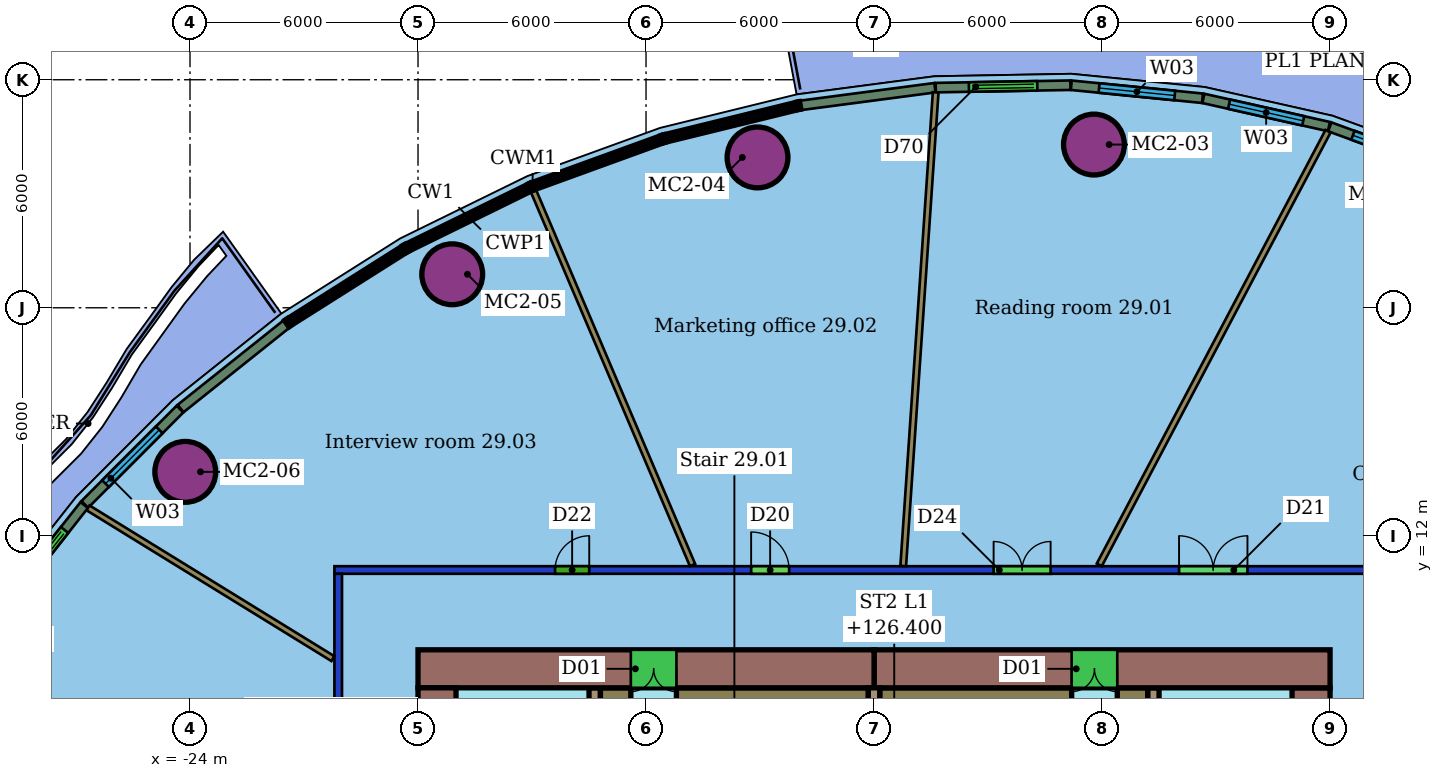
"""IFC4 building model, lengths in metres.
Left out: names, types, materials, properties, quantities, classifications, styles, units other than length and angle.
Written with IfcOpenShell. Run it as: python <this file> out.ifc"""

import sys

from ifc_helpers import new_model, si_unit, direction, frame, frame_2d, origin, origin_2d, place, context, subcontext, project, spatial, rectangle, hollow_circle, extrude, element, fill, save


model = new_model("IFC4")
c1 = context("Model", 3, precision=1e-05, world=origin(), true_north=direction((0.0, 1.0)))
c2 = subcontext(c1, "Body", "Model", "MODEL_VIEW")
j1 = project(units=[si_unit("LENGTHUNIT", "METRE"), si_unit("PLANEANGLEUNIT", "RADIAN")], contexts=[c1])
p1 = place(None, origin())
s1 = spatial("IfcSite", under=j1, at=p1, CompositionType="ELEMENT")
p2 = place(p1, origin())
s2 = spatial("IfcBuilding", under=s1, at=p2, CompositionType="ELEMENT")
p3 = place(p2, frame((0.0, 0.0, 124.6)))
s3 = spatial("IfcBuildingStorey", under=s2, at=p3, CompositionType="ELEMENT", Elevation=124.6)
for number, where, z_axis, x_axis in (
    (1, (-0.213, 22.294, 0.0), (0.0, 0.0, 1.0), (1.0, 0.0, 0.0)),
    (2, (-9.066, 21.956, 0.0), (0.0, 0.0, 1.0), (1.0, 0.0, 0.0)),
    (3, (-17.1, 18.881, 0.0), (0.0, 0.0, 1.0), (1.0, 0.0, 0.0)),
    (4, (-24.125, 13.683, 0.0), (0.0, 0.0, 1.0), (1.0, 0.0, 0.0)),
):
    element("IfcColumn", number, at=place(p3, frame(where, z_axis=z_axis, x_axis=x_axis)), inside=s3, PredefinedType="COLUMN", context=c2, shape_type="SweptSolid", body=[
        extrude(hollow_circle(Radius=0.8, WallThickness=0.055, at=origin_2d()), origin(), (0.0, 0.0, 1.0), 3.45),
    ])
p4 = place(p3, frame((-20.1, -11.0, 0.0), z_axis=(0.0, 0.0, 1.0), x_axis=(0.0, 1.0, 0.0)))
e5 = element("IfcWall", 5, at=p4, inside=s3, PredefinedType="PARTITIONING", context=c2, shape_type="SweptSolid", body=[
    extrude(rectangle(XDim=22.0, YDim=0.2, at=frame_2d((11.0, 0.0))), origin(), (0.0, 0.0, 1.0), 3.0),
])
p5 = place(p4, frame((15.057, 0.0, 0.0)))
e6 = element("IfcOpeningElement", 6, at=p5, cuts=e5, PredefinedType="OPENING", context=c2, shape_type="SweptSolid", body=[
    extrude(rectangle(XDim=1.0, YDim=2.1, at=frame_2d((0.5, 1.05))), frame((0.0, 0.11, 0.0), z_axis=(0.0, -1.0, 0.0), x_axis=(1.0, 0.0, 0.0)), (0.0, 0.0, 1.0), 0.22),
])
p6 = place(p4, frame((9.649, 0.0, 0.0)))
e7 = element("IfcOpeningElement", 7, at=p6, cuts=e5, PredefinedType="OPENING", context=c2, shape_type="SweptSolid", body=[
    extrude(rectangle(XDim=1.0, YDim=2.4, at=frame_2d((0.5, 1.2))), frame((0.0, 0.11, 0.0), z_axis=(0.0, -1.0, 0.0), x_axis=(1.0, 0.0, 0.0)), (0.0, 0.0, 1.0), 0.22),
])
p7 = place(p4, frame((5.594, 0.0, 0.0)))
e8 = element("IfcOpeningElement", 8, at=p7, cuts=e5, PredefinedType="OPENING", context=c2, shape_type="SweptSolid", body=[
    extrude(rectangle(XDim=1.8, YDim=2.4, at=frame_2d((0.9, 1.2))), frame((0.0, 0.11, 0.0), z_axis=(0.0, -1.0, 0.0), x_axis=(1.0, 0.0, 0.0)), (0.0, 0.0, 1.0), 0.22),
])
p8 = place(p3, frame((-20.2, 11.1, 0.0), z_axis=(0.0, 0.0, 1.0), x_axis=(1.0, 0.0, 0.0)))
e9 = element("IfcWall", 9, at=p8, inside=s3, PredefinedType="PARTITIONING", context=c2, shape_type="SweptSolid", body=[
    extrude(rectangle(XDim=28.4, YDim=0.2, at=frame_2d((14.2, 0.0))), origin(), (0.0, 0.0, 1.0), 3.0),
])
p9 = place(p8, frame((17.346, 0.0, 0.0)))
e10 = element("IfcOpeningElement", 10, at=p9, cuts=e9, PredefinedType="OPENING", context=c2, shape_type="SweptSolid", body=[
    extrude(rectangle(XDim=1.5, YDim=2.1, at=frame_2d((0.75, 1.05))), frame((0.0, 0.11, 0.0), z_axis=(0.0, -1.0, 0.0), x_axis=(1.0, 0.0, 0.0)), (0.0, 0.0, 1.0), 0.22),
])
p10 = place(p8, frame((10.966, 0.0, 0.0)))
e11 = element("IfcOpeningElement", 11, at=p10, cuts=e9, PredefinedType="OPENING", context=c2, shape_type="SweptSolid", body=[
    extrude(rectangle(XDim=1.0, YDim=2.1, at=frame_2d((0.5, 1.05))), frame((0.0, 0.11, 0.0), z_axis=(0.0, -1.0, 0.0), x_axis=(1.0, 0.0, 0.0)), (0.0, 0.0, 1.0), 0.22),
])
p11 = place(p8, frame((5.806, 0.0, 0.0)))
e12 = element("IfcOpeningElement", 12, at=p11, cuts=e9, PredefinedType="OPENING", context=c2, shape_type="SweptSolid", body=[
    extrude(rectangle(XDim=0.9, YDim=2.1, at=frame_2d((0.45, 1.05))), frame((0.0, 0.11, 0.0), z_axis=(0.0, -1.0, 0.0), x_axis=(1.0, 0.0, 0.0)), (0.0, 0.0, 1.0), 0.22),
])
p12 = place(p8, frame((22.226, 0.0, 0.0)))
e13 = element("IfcOpeningElement", 13, at=p12, cuts=e9, PredefinedType="OPENING", context=c2, shape_type="SweptSolid", body=[
    extrude(rectangle(XDim=1.8, YDim=2.1, at=frame_2d((0.9, 1.05))), frame((0.0, 0.11, 0.0), z_axis=(0.0, -1.0, 0.0), x_axis=(1.0, 0.0, 0.0)), (0.0, 0.0, 1.0), 0.22),
])
p13 = place(p3, frame((5.946, 22.644, 0.0), z_axis=(0.0, 0.0, 1.0), x_axis=(-0.466623744036, -0.884455924002, 0.0)))
e14 = element("IfcWall", 14, at=p13, inside=s3, PredefinedType="PARTITIONING", context=c2, shape_type="SweptSolid", body=[
    extrude(rectangle(XDim=12.9, YDim=0.15, at=frame_2d((6.45, 0.0))), origin(), (0.0, 0.0, 1.0), 3.45),
])
p14 = place(p3, frame((-4.378, 23.667, 0.0), z_axis=(0.0, 0.0, 1.0), x_axis=(-0.068347975622, -0.997661542923, 0.0)))
e15 = element("IfcWall", 15, at=p14, inside=s3, PredefinedType="PARTITIONING", context=c2, shape_type="SweptSolid", body=[
    extrude(rectangle(XDim=12.491, YDim=0.15, at=frame_2d((6.246, 0.0))), origin(), (0.0, 0.0, 1.0), 3.45),
])
p15 = place(p3, frame((-14.961, 21.071, 0.0), z_axis=(0.0, 0.0, 1.0), x_axis=(0.391369274345, -0.920233715476, 0.0)))
e16 = element("IfcWall", 16, at=p15, inside=s3, PredefinedType="PARTITIONING", context=c2, shape_type="SweptSolid", body=[
    extrude(rectangle(XDim=10.695, YDim=0.15, at=frame_2d((5.347, 0.0))), origin(), (0.0, 0.0, 1.0), 3.45),
])
p16 = place(p3, frame((-26.683, 12.735, 0.0), z_axis=(0.0, 0.0, 1.0), x_axis=(0.851532002379, -0.524302631049, 0.0)))
e17 = element("IfcWall", 17, at=p16, inside=s3, PredefinedType="PARTITIONING", context=c2, shape_type="SweptSolid", body=[
    extrude(rectangle(XDim=7.567, YDim=0.15, at=frame_2d((3.783, 0.0))), origin(), (0.0, 0.0, 1.0), 3.45),
])
p17 = place(p3, frame((9.089, 21.632, 0.0), z_axis=(0.0, 0.0, 1.0), x_axis=(-0.939579104827, 0.342331864969, 0.0)))
e18 = element("IfcWall", 18, at=p17, inside=s3, PredefinedType="SOLIDWALL", context=c2, shape_type="SweptSolid", body=[
    extrude(rectangle(XDim=3.296, YDim=0.25, at=frame_2d((1.648, 0.0))), origin(), (0.0, 0.0, 1.0), 3.05),
])
p18 = place(p17, frame((0.648, 0.0, 0.9)))
e19 = element("IfcOpeningElement", 19, at=p18, cuts=e18, PredefinedType="OPENING", context=c2, shape_type="SweptSolid", body=[
    extrude(rectangle(XDim=2.0, YDim=2.1, at=frame_2d((1.0, 1.05))), frame((0.0, 0.135, 0.0), z_axis=(0.0, -1.0, 0.0), x_axis=(1.0, 0.0, 0.0)), (0.0, 0.0, 1.0), 0.27),
])
p19 = place(p3, frame((5.969, 22.767, 0.0), z_axis=(0.0, 0.0, 1.0), x_axis=(-0.975690768568, 0.219151828949, 0.0)))
e20 = element("IfcWall", 20, at=p19, inside=s3, PredefinedType="SOLIDWALL", context=c2, shape_type="SweptSolid", body=[
    extrude(rectangle(XDim=3.385, YDim=0.25, at=frame_2d((1.693, 0.0))), origin(), (0.0, 0.0, 1.0), 3.05),
])
p20 = place(p19, frame((0.693, 0.0, 0.9)))
e21 = element("IfcOpeningElement", 21, at=p20, cuts=e20, PredefinedType="OPENING", context=c2, shape_type="SweptSolid", body=[
    extrude(rectangle(XDim=2.0, YDim=2.1, at=frame_2d((1.0, 1.05))), frame((0.0, 0.135, 0.0), z_axis=(0.0, -1.0, 0.0), x_axis=(1.0, 0.0, 0.0)), (0.0, 0.0, 1.0), 0.27),
])
p21 = place(p3, frame((2.643, 23.513, 0.0), z_axis=(0.0, 0.0, 1.0), x_axis=(-0.995116970578, 0.09870265887, 0.0)))
e22 = element("IfcWall", 22, at=p21, inside=s3, PredefinedType="SOLIDWALL", context=c2, shape_type="SweptSolid", body=[
    extrude(rectangle(XDim=3.47, YDim=0.25, at=frame_2d((1.735, 0.0))), origin(), (0.0, 0.0, 1.0), 3.05),
])
p22 = place(p21, frame((0.735, 0.0, 0.9)))
e23 = element("IfcOpeningElement", 23, at=p22, cuts=e22, PredefinedType="OPENING", context=c2, shape_type="SweptSolid", body=[
    extrude(rectangle(XDim=2.0, YDim=2.1, at=frame_2d((1.0, 1.05))), frame((0.0, 0.135, 0.0), z_axis=(0.0, -1.0, 0.0), x_axis=(1.0, 0.0, 0.0)), (0.0, 0.0, 1.0), 0.27),
])
p23 = place(p3, frame((-0.833, 23.856, 0.0), z_axis=(0.0, 0.0, 1.0), x_axis=(-0.999835910543, -0.018114965863, 0.0)))
e24 = element("IfcWall", 24, at=p23, inside=s3, PredefinedType="SOLIDWALL", context=c2, shape_type="SweptSolid", body=[
    extrude(rectangle(XDim=3.544, YDim=0.25, at=frame_2d((1.772, 0.0))), origin(), (0.0, 0.0, 1.0), 3.05),
])
p24 = place(p23, frame((0.872, 0.0, 0.0)))
e25 = element("IfcOpeningElement", 25, at=p24, cuts=e24, PredefinedType="OPENING", context=c2, shape_type="SweptSolid", body=[
    extrude(rectangle(XDim=1.8, YDim=2.4, at=frame_2d((0.9, 1.2))), frame((0.0, 0.135, 0.0), z_axis=(0.0, -1.0, 0.0), x_axis=(1.0, 0.0, 0.0)), (0.0, 0.0, 1.0), 0.27),
])
p25 = place(p3, frame((-4.399, 23.79, 0.0), z_axis=(0.0, 0.0, 1.0), x_axis=(-0.991455229273, -0.130447416026, 0.0)))
e26 = element("IfcWall", 26, at=p25, inside=s3, PredefinedType="SOLIDWALL", context=c2, shape_type="SweptSolid", body=[
    extrude(rectangle(XDim=3.56, YDim=0.25, at=frame_2d((1.78, 0.0))), origin(), (0.0, 0.0, 1.0), 3.05),
])
p26 = place(p3, frame((-21.465, 17.569, 0.0), z_axis=(0.0, 0.0, 1.0), x_axis=(-0.781691181116, -0.623665693594, 0.0)))
e27 = element("IfcWall", 27, at=p26, inside=s3, PredefinedType="SOLIDWALL", context=c2, shape_type="SweptSolid", body=[
    extrude(rectangle(XDim=3.56, YDim=0.25, at=frame_2d((1.78, 0.0))), origin(), (0.0, 0.0, 1.0), 3.05),
])
p27 = place(p3, frame((-24.264, 15.334, 0.0), z_axis=(0.0, 0.0, 1.0), x_axis=(-0.706555538576, -0.707657594397, 0.0)))
e28 = element("IfcWall", 28, at=p27, inside=s3, PredefinedType="SOLIDWALL", context=c2, shape_type="SweptSolid", body=[
    extrude(rectangle(XDim=3.544, YDim=0.25, at=frame_2d((1.772, 0.0))), origin(), (0.0, 0.0, 1.0), 3.05),
])
p28 = place(p27, frame((0.772, 0.0, 0.9)))
e29 = element("IfcOpeningElement", 29, at=p28, cuts=e28, PredefinedType="OPENING", context=c2, shape_type="SweptSolid", body=[
    extrude(rectangle(XDim=2.0, YDim=2.1, at=frame_2d((1.0, 1.05))), frame((0.0, 0.135, 0.0), z_axis=(0.0, -1.0, 0.0), x_axis=(1.0, 0.0, 0.0)), (0.0, 0.0, 1.0), 0.27),
])
p29 = place(p3, frame((-26.783, 12.809, 0.0), z_axis=(0.0, 0.0, 1.0), x_axis=(-0.61919708365, -0.785235615341, 0.0)))
e30 = element("IfcWall", 30, at=p29, inside=s3, PredefinedType="SOLIDWALL", context=c2, shape_type="SweptSolid", body=[
    extrude(rectangle(XDim=3.47, YDim=0.25, at=frame_2d((1.735, 0.0))), origin(), (0.0, 0.0, 1.0), 3.05),
])
p30 = place(p29, frame((0.835, 0.0, 0.0)))
e31 = element("IfcOpeningElement", 31, at=p30, cuts=e30, PredefinedType="OPENING", context=c2, shape_type="SweptSolid", body=[
    extrude(rectangle(XDim=1.8, YDim=2.4, at=frame_2d((0.9, 1.2))), frame((0.0, 0.135, 0.0), z_axis=(0.0, -1.0, 0.0), x_axis=(1.0, 0.0, 0.0)), (0.0, 0.0, 1.0), 0.27),
])
p31 = place(p3, frame((6.0, 8.5, 0.0), z_axis=(0.0, 0.0, 1.0), x_axis=(-1.0, 0.0, 0.0)))
e32 = element("IfcWall", 32, at=p31, inside=s3, PredefinedType="SHEAR", context=c2, shape_type="SweptSolid", body=[
    extrude(rectangle(XDim=12.0, YDim=1.0, at=frame_2d((6.0, 0.0))), origin(), (0.0, 0.0, 1.0), 3.3),
])
p32 = place(p31, frame((5.6, 0.0, 0.0)))
e33 = element("IfcOpeningElement", 33, at=p32, cuts=e32, PredefinedType="OPENING", context=c2, shape_type="SweptSolid", body=[
    extrude(rectangle(XDim=1.2, YDim=2.1, at=frame_2d((0.6, 1.05))), frame((0.0, 0.51, 0.0), z_axis=(0.0, -1.0, 0.0), x_axis=(1.0, 0.0, 0.0)), (0.0, 0.0, 1.0), 1.02),
])
p33 = place(p3, frame((-6.0, 8.5, 0.0), z_axis=(0.0, 0.0, 1.0), x_axis=(-1.0, 0.0, 0.0)))
e34 = element("IfcWall", 34, at=p33, inside=s3, PredefinedType="SHEAR", context=c2, shape_type="SweptSolid", body=[
    extrude(rectangle(XDim=12.0, YDim=1.0, at=frame_2d((6.0, 0.0))), origin(), (0.0, 0.0, 1.0), 3.3),
])
p34 = place(p33, frame((5.2, 0.0, 0.0)))
e35 = element("IfcOpeningElement", 35, at=p34, cuts=e34, PredefinedType="OPENING", context=c2, shape_type="SweptSolid", body=[
    extrude(rectangle(XDim=1.2, YDim=2.1, at=frame_2d((0.6, 1.05))), frame((0.0, 0.51, 0.0), z_axis=(0.0, -1.0, 0.0), x_axis=(1.0, 0.0, 0.0)), (0.0, 0.0, 1.0), 1.02),
])
p35 = place(p3, frame((-17.5, 8.0, 0.0), z_axis=(0.0, 0.0, 1.0), x_axis=(0.0, -1.0, 0.0)))
e36 = element("IfcWall", 36, at=p35, inside=s3, PredefinedType="SHEAR", context=c2, shape_type="SweptSolid", body=[
    extrude(rectangle(XDim=16.0, YDim=1.0, at=frame_2d((8.0, 0.0))), origin(), (0.0, 0.0, 1.0), 3.3),
])
p36 = place(p35, frame((11.9, 0.0, 0.0)))
e37 = element("IfcOpeningElement", 37, at=p36, cuts=e36, PredefinedType="OPENING", context=c2, shape_type="SweptSolid", body=[
    extrude(rectangle(XDim=1.2, YDim=2.1, at=frame_2d((0.6, 1.05))), frame((0.0, 0.51, 0.0), z_axis=(0.0, -1.0, 0.0), x_axis=(1.0, 0.0, 0.0)), (0.0, 0.0, 1.0), 1.02),
])
p37 = place(p35, frame((2.9, 0.0, 0.0)))
e38 = element("IfcOpeningElement", 38, at=p37, cuts=e36, PredefinedType="OPENING", context=c2, shape_type="SweptSolid", body=[
    extrude(rectangle(XDim=1.2, YDim=2.1, at=frame_2d((0.6, 1.05))), frame((0.0, 0.51, 0.0), z_axis=(0.0, -1.0, 0.0), x_axis=(1.0, 0.0, 0.0)), (0.0, 0.0, 1.0), 1.02),
])
p38 = place(p3, frame((5.5, -8.0, 0.0), z_axis=(0.0, 0.0, 1.0), x_axis=(0.0, 1.0, 0.0)))
e39 = element("IfcWall", 39, at=p38, inside=s3, PredefinedType="SHEAR", context=c2, shape_type="SweptSolid", body=[
    extrude(rectangle(XDim=16.0, YDim=1.0, at=frame_2d((8.0, 0.0))), origin(), (0.0, 0.0, 1.0), 3.3),
])
p39 = place(p38, frame((2.9, 0.0, 0.0)))
e40 = element("IfcOpeningElement", 40, at=p39, cuts=e39, PredefinedType="OPENING", context=c2, shape_type="SweptSolid", body=[
    extrude(rectangle(XDim=1.2, YDim=2.1, at=frame_2d((0.6, 1.05))), frame((0.0, 0.51, 0.0), z_axis=(0.0, -1.0, 0.0), x_axis=(1.0, 0.0, 0.0)), (0.0, 0.0, 1.0), 1.02),
])
p40 = place(p38, frame((11.9, 0.0, 0.0)))
e41 = element("IfcOpeningElement", 41, at=p40, cuts=e39, PredefinedType="OPENING", context=c2, shape_type="SweptSolid", body=[
    extrude(rectangle(XDim=1.2, YDim=2.1, at=frame_2d((0.6, 1.05))), frame((0.0, 0.51, 0.0), z_axis=(0.0, -1.0, 0.0), x_axis=(1.0, 0.0, 0.0)), (0.0, 0.0, 1.0), 1.02),
])
p41 = place(p3, frame((-13.35, 8.0, 0.0), z_axis=(0.0, 0.0, 1.0), x_axis=(0.0, -1.0, 0.0)))
e42 = element("IfcWall", 42, at=p41, inside=s3, PredefinedType="SHEAR", context=c2, shape_type="SweptSolid", body=[
    extrude(rectangle(XDim=16.0, YDim=0.3, at=frame_2d((8.0, 0.0))), origin(), (0.0, 0.0, 1.0), 3.3),
])
p42 = place(p41, frame((7.25, 0.0, 0.0)))
e43 = element("IfcOpeningElement", 43, at=p42, cuts=e42, PredefinedType="OPENING", context=c2, shape_type="SweptSolid", body=[
    extrude(rectangle(XDim=1.5, YDim=2.1, at=frame_2d((0.75, 1.05))), frame((0.0, 0.16, 0.0), z_axis=(0.0, -1.0, 0.0), x_axis=(1.0, 0.0, 0.0)), (0.0, 0.0, 1.0), 0.32),
])
p43 = place(p3, frame((1.35, -8.0, 0.0), z_axis=(0.0, 0.0, 1.0), x_axis=(0.0, 1.0, 0.0)))
e44 = element("IfcWall", 44, at=p43, inside=s3, PredefinedType="SHEAR", context=c2, shape_type="SweptSolid", body=[
    extrude(rectangle(XDim=16.0, YDim=0.3, at=frame_2d((8.0, 0.0))), origin(), (0.0, 0.0, 1.0), 3.3),
])
p44 = place(p43, frame((1.91, 0.0, 0.0)))
e45 = element("IfcOpeningElement", 45, at=p44, cuts=e44, PredefinedType="OPENING", context=c2, shape_type="SweptSolid", body=[
    extrude(rectangle(XDim=1.0, YDim=2.1, at=frame_2d((0.5, 1.05))), frame((0.0, 0.16, 0.0), z_axis=(0.0, -1.0, 0.0), x_axis=(1.0, 0.0, 0.0)), (0.0, 0.0, 1.0), 0.32),
])
p45 = place(p43, frame((7.25, 0.0, 0.0)))
e46 = element("IfcOpeningElement", 46, at=p45, cuts=e44, PredefinedType="OPENING", context=c2, shape_type="SweptSolid", body=[
    extrude(rectangle(XDim=1.5, YDim=2.1, at=frame_2d((0.75, 1.05))), frame((0.0, 0.16, 0.0), z_axis=(0.0, -1.0, 0.0), x_axis=(1.0, 0.0, 0.0)), (0.0, 0.0, 1.0), 0.32),
])
p46 = place(p3, frame((-6.0, 3.88, 0.0), z_axis=(0.0, 0.0, 1.0), x_axis=(0.0, 1.0, 0.0)))
e47 = element("IfcWall", 47, at=p46, inside=s3, PredefinedType="SHEAR", context=c2, shape_type="SweptSolid", body=[
    extrude(rectangle(XDim=4.12, YDim=0.3, at=frame_2d((2.06, 0.0))), origin(), (0.0, 0.0, 1.0), 3.3),
])
p47 = place(p3, frame((-13.2, 7.65, 0.0), z_axis=(0.0, 0.0, 1.0), x_axis=(1.0, 0.0, 0.0)))
e48 = element("IfcWall", 48, at=p47, inside=s3, PredefinedType="SHEAR", context=c2, shape_type="SweptSolid", body=[
    extrude(rectangle(XDim=0.8, YDim=0.7, at=frame_2d((0.4, 0.0))), origin(), (0.0, 0.0, 1.0), 3.3),
])
for number, where, z_axis, x_axis in (
    (49, (-11.2, 7.65, 0.0), (0.0, 0.0, 1.0), (1.0, 0.0, 0.0)),
    (50, (-5.85, 7.65, 0.0), (0.0, 0.0, 1.0), (1.0, 0.0, 0.0)),
):
    element("IfcWall", number, at=place(p3, frame(where, z_axis=z_axis, x_axis=x_axis)), inside=s3, PredefinedType="SHEAR", context=c2, shape_type="SweptSolid", body=[
        extrude(rectangle(XDim=5.05, YDim=0.7, at=frame_2d((2.525, 0.0))), origin(), (0.0, 0.0, 1.0), 3.3),
    ])
p48 = place(p3, frame((0.4, 7.65, 0.0), z_axis=(0.0, 0.0, 1.0), x_axis=(1.0, 0.0, 0.0)))
e51 = element("IfcWall", 51, at=p48, inside=s3, PredefinedType="SHEAR", context=c2, shape_type="SweptSolid", body=[
    extrude(rectangle(XDim=0.8, YDim=0.7, at=frame_2d((0.4, 0.0))), origin(), (0.0, 0.0, 1.0), 3.3),
])
p49 = place(p9, origin())
e52 = element("IfcDoor", 52, at=p49, inside=s3, OperationType="DOUBLE_DOOR_SINGLE_SWING", PredefinedType="DOOR", context=c2, shape_type="SweptSolid", body=[
    extrude(rectangle(XDim=1.5, YDim=2.1, at=frame_2d((0.75, 1.05))), frame((0.0, 0.025, 0.0), z_axis=(0.0, -1.0, 0.0), x_axis=(1.0, 0.0, 0.0)), (0.0, 0.0, 1.0), 0.05),
])
fill(e10, e52)
p50 = place(p10, origin())
e53 = element("IfcDoor", 53, at=p50, inside=s3, OperationType="SINGLE_SWING_LEFT", PredefinedType="DOOR", context=c2, shape_type="SweptSolid", body=[
    extrude(rectangle(XDim=1.0, YDim=2.1, at=frame_2d((0.5, 1.05))), frame((0.0, 0.025, 0.0), z_axis=(0.0, -1.0, 0.0), x_axis=(1.0, 0.0, 0.0)), (0.0, 0.0, 1.0), 0.05),
])
fill(e11, e53)
p51 = place(p11, origin())
e54 = element("IfcDoor", 54, at=p51, inside=s3, OperationType="SINGLE_SWING_RIGHT", PredefinedType="DOOR", context=c2, shape_type="SweptSolid", body=[
    extrude(rectangle(XDim=0.9, YDim=2.1, at=frame_2d((0.45, 1.05))), frame((0.0, 0.025, 0.0), z_axis=(0.0, -1.0, 0.0), x_axis=(1.0, 0.0, 0.0)), (0.0, 0.0, 1.0), 0.05),
])
fill(e12, e54)
p52 = place(p12, origin())
e55 = element("IfcDoor", 55, at=p52, inside=s3, OperationType="DOUBLE_DOOR_SINGLE_SWING", PredefinedType="DOOR", context=c2, shape_type="SweptSolid", body=[
    extrude(rectangle(XDim=1.8, YDim=2.1, at=frame_2d((0.9, 1.05))), frame((0.0, 0.025, 0.0), z_axis=(0.0, -1.0, 0.0), x_axis=(1.0, 0.0, 0.0)), (0.0, 0.0, 1.0), 0.05),
])
fill(e13, e55)
p53 = place(p18, origin())
e56 = element("IfcWindow", 56, at=p53, inside=s3, PartitioningType="SINGLE_PANEL", PredefinedType="WINDOW", context=c2, shape_type="SweptSolid", body=[
    extrude(rectangle(XDim=2.0, YDim=2.1, at=frame_2d((1.0, 1.05))), frame((0.0, 0.03, 0.0), z_axis=(0.0, -1.0, 0.0), x_axis=(1.0, 0.0, 0.0)), (0.0, 0.0, 1.0), 0.06),
])
fill(e19, e56)
p54 = place(p20, origin())
e57 = element("IfcWindow", 57, at=p54, inside=s3, PartitioningType="SINGLE_PANEL", PredefinedType="WINDOW", context=c2, shape_type="SweptSolid", body=[
    extrude(rectangle(XDim=2.0, YDim=2.1, at=frame_2d((1.0, 1.05))), frame((0.0, 0.03, 0.0), z_axis=(0.0, -1.0, 0.0), x_axis=(1.0, 0.0, 0.0)), (0.0, 0.0, 1.0), 0.06),
])
fill(e21, e57)
p55 = place(p22, origin())
e58 = element("IfcWindow", 58, at=p55, inside=s3, PartitioningType="SINGLE_PANEL", PredefinedType="WINDOW", context=c2, shape_type="SweptSolid", body=[
    extrude(rectangle(XDim=2.0, YDim=2.1, at=frame_2d((1.0, 1.05))), frame((0.0, 0.03, 0.0), z_axis=(0.0, -1.0, 0.0), x_axis=(1.0, 0.0, 0.0)), (0.0, 0.0, 1.0), 0.06),
])
fill(e23, e58)
p56 = place(p24, origin())
e59 = element("IfcDoor", 59, at=p56, inside=s3, OperationType="DOUBLE_DOOR_SLIDING", PredefinedType="DOOR", context=c2, shape_type="SweptSolid", body=[
    extrude(rectangle(XDim=1.8, YDim=2.4, at=frame_2d((0.9, 1.2))), frame((0.0, 0.025, 0.0), z_axis=(0.0, -1.0, 0.0), x_axis=(1.0, 0.0, 0.0)), (0.0, 0.0, 1.0), 0.05),
])
fill(e25, e59)
p57 = place(p28, origin())
e60 = element("IfcWindow", 60, at=p57, inside=s3, PartitioningType="SINGLE_PANEL", PredefinedType="WINDOW", context=c2, shape_type="SweptSolid", body=[
    extrude(rectangle(XDim=2.0, YDim=2.1, at=frame_2d((1.0, 1.05))), frame((0.0, 0.03, 0.0), z_axis=(0.0, -1.0, 0.0), x_axis=(1.0, 0.0, 0.0)), (0.0, 0.0, 1.0), 0.06),
])
fill(e29, e60)
p58 = place(p30, origin())
e61 = element("IfcDoor", 61, at=p58, inside=s3, OperationType="DOUBLE_DOOR_SLIDING", PredefinedType="DOOR", context=c2, shape_type="SweptSolid", body=[
    extrude(rectangle(XDim=1.8, YDim=2.4, at=frame_2d((0.9, 1.2))), frame((0.0, 0.025, 0.0), z_axis=(0.0, -1.0, 0.0), x_axis=(1.0, 0.0, 0.0)), (0.0, 0.0, 1.0), 0.05),
])
fill(e31, e61)
p59 = place(p32, origin())
e62 = element("IfcDoor", 62, at=p59, inside=s3, OperationType="DOUBLE_DOOR_SINGLE_SWING", PredefinedType="NOTDEFINED", context=c2, shape_type="SweptSolid", body=[
    extrude(rectangle(XDim=1.2, YDim=2.1, at=frame_2d((0.6, 1.05))), frame((0.0, 0.025, 0.0), z_axis=(0.0, -1.0, 0.0), x_axis=(1.0, 0.0, 0.0)), (0.0, 0.0, 1.0), 0.05),
])
fill(e33, e62)
p60 = place(p34, origin())
e63 = element("IfcDoor", 63, at=p60, inside=s3, OperationType="DOUBLE_DOOR_SINGLE_SWING", PredefinedType="NOTDEFINED", context=c2, shape_type="SweptSolid", body=[
    extrude(rectangle(XDim=1.2, YDim=2.1, at=frame_2d((0.6, 1.05))), frame((0.0, 0.025, 0.0), z_axis=(0.0, -1.0, 0.0), x_axis=(1.0, 0.0, 0.0)), (0.0, 0.0, 1.0), 0.05),
])
fill(e35, e63)
save(model, sys.argv[1])
